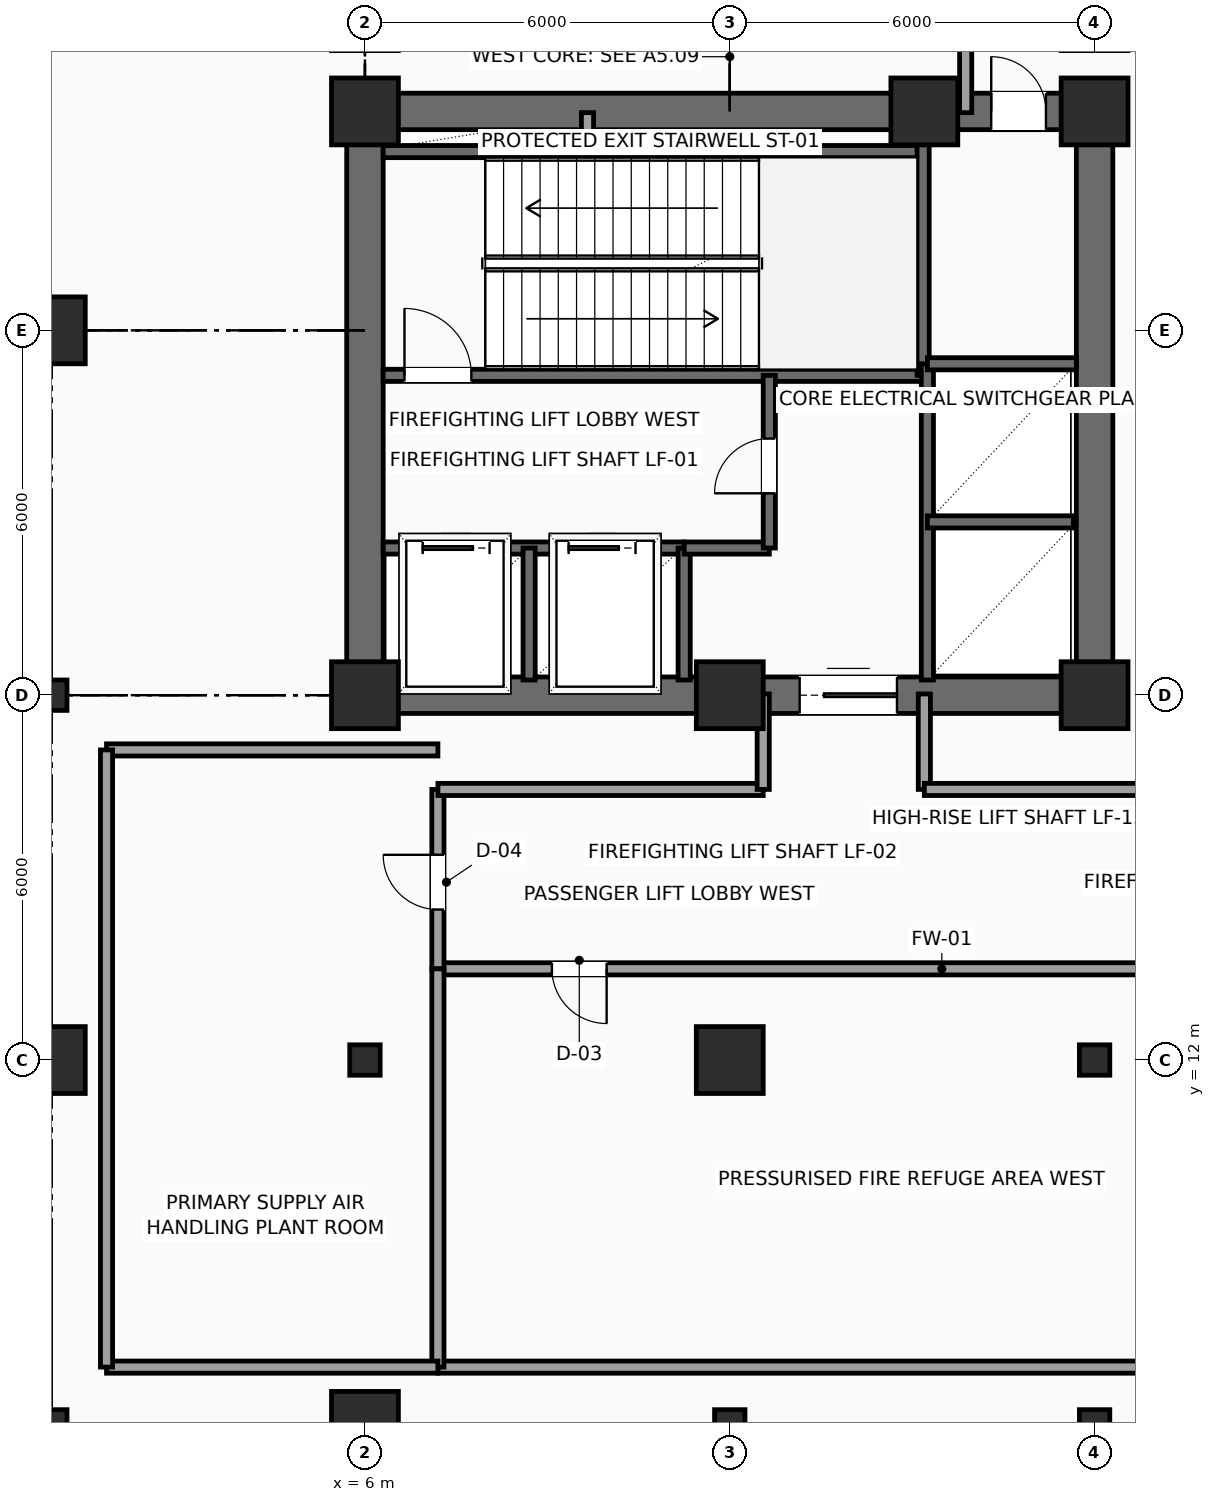
"""IFC4 building model, lengths in metres.
Left out: names, types, materials, properties, quantities, classifications, styles, units other than length and angle.
Written with IfcOpenShell. Run it as: python <this file> out.ifc"""

import sys

from ifc_helpers import new_model, si_unit, direction, frame, frame_2d, origin, origin_2d, place, context, subcontext, project, spatial, rectangle, hollow_rectangle, extrude, element, fill, save


model = new_model("IFC4")
c1 = context("Model", 3, precision=1e-05, world=origin(), true_north=direction((0.0, 1.0)))
c2 = subcontext(c1, "Body", "Model", "MODEL_VIEW")
j1 = project(units=[si_unit("LENGTHUNIT", "METRE"), si_unit("PLANEANGLEUNIT", "RADIAN")], contexts=[c1])
p1 = place(None, origin())
s1 = spatial("IfcSite", under=j1, at=p1, CompositionType="ELEMENT")
p2 = place(p1, origin())
s2 = spatial("IfcBuilding", under=s1, at=p2, CompositionType="ELEMENT")
p3 = place(p2, frame((0.0, 0.0, 164.4)))
s3 = spatial("IfcBuildingStorey", under=s2, at=p3, CompositionType="ELEMENT", Elevation=164.4)
for number, where, z_axis, x_axis in (
    (1, (6.0, 18.0, 0.0), (0.0, 0.0, 1.0), (1.0, 0.0, 0.0)),
    (2, (12.0, 18.0, 0.0), (0.0, 0.0, 1.0), (1.0, 0.0, 0.0)),
    (3, (18.0, 18.0, 0.0), (0.0, 0.0, 1.0), (1.0, 0.0, 0.0)),
    (4, (6.0, 27.6, 0.0), (0.0, 0.0, 1.0), (1.0, 0.0, 0.0)),
    (5, (15.2, 27.6, 0.0), (0.0, 0.0, 1.0), (1.0, 0.0, 0.0)),
    (6, (18.0, 27.6, 0.0), (0.0, 0.0, 1.0), (1.0, 0.0, 0.0)),
):
    element("IfcColumn", number, at=place(p3, frame(where, z_axis=z_axis, x_axis=x_axis)), inside=s3, PredefinedType="COLUMN", context=c2, shape_type="SweptSolid", body=[
        extrude(rectangle(XDim=1.1, YDim=1.1, at=origin_2d()), origin(), (0.0, 0.0, 1.0), 4.8),
    ])
p4 = place(p3, frame((0.85, 6.0, 0.0), z_axis=(0.0, 0.0, 1.0), x_axis=(1.0, 0.0, 0.0)))
e7 = element("IfcColumn", 7, at=p4, inside=s3, PredefinedType="COLUMN", context=c2, shape_type="SweptSolid", body=[
    extrude(hollow_rectangle(XDim=0.5, YDim=0.5, WallThickness=0.025, InnerFilletRadius=0.025, OuterFilletRadius=0.04, at=origin_2d()), origin(), (0.0, 0.0, 1.0), 4.8),
])
p5 = place(p3, frame((0.85, 12.0, 0.0), z_axis=(0.0, 0.0, 1.0), x_axis=(1.0, 0.0, 0.0)))
e8 = element("IfcColumn", 8, at=p5, inside=s3, PredefinedType="COLUMN", context=c2, shape_type="SweptSolid", body=[
    extrude(rectangle(XDim=1.1, YDim=1.1, at=origin_2d()), origin(), (0.0, 0.0, 1.0), 4.8),
])
p6 = place(p3, frame((0.85, 18.0, 0.0), z_axis=(0.0, 0.0, 1.0), x_axis=(1.0, 0.0, 0.0)))
e9 = element("IfcColumn", 9, at=p6, inside=s3, PredefinedType="COLUMN", context=c2, shape_type="SweptSolid", body=[
    extrude(hollow_rectangle(XDim=0.5, YDim=0.5, WallThickness=0.025, InnerFilletRadius=0.025, OuterFilletRadius=0.04, at=origin_2d()), origin(), (0.0, 0.0, 1.0), 4.8),
])
for number, where, z_axis, x_axis in (
    (10, (0.85, 24.0, 0.0), (0.0, 0.0, 1.0), (1.0, 0.0, 0.0)),
    (11, (6.0, 6.0, 0.0), (0.0, 0.0, 1.0), (1.0, 0.0, 0.0)),
):
    element("IfcColumn", number, at=place(p3, frame(where, z_axis=z_axis, x_axis=x_axis)), inside=s3, PredefinedType="COLUMN", context=c2, shape_type="SweptSolid", body=[
        extrude(rectangle(XDim=1.1, YDim=1.1, at=origin_2d()), origin(), (0.0, 0.0, 1.0), 4.8),
    ])
for number, where, z_axis, x_axis in (
    (12, (6.0, 12.0, 0.0), (0.0, 0.0, 1.0), (1.0, 0.0, 0.0)),
    (13, (12.0, 6.0, 0.0), (0.0, 0.0, 1.0), (1.0, 0.0, 0.0)),
):
    element("IfcColumn", number, at=place(p3, frame(where, z_axis=z_axis, x_axis=x_axis)), inside=s3, PredefinedType="COLUMN", context=c2, shape_type="SweptSolid", body=[
        extrude(hollow_rectangle(XDim=0.5, YDim=0.5, WallThickness=0.025, InnerFilletRadius=0.025, OuterFilletRadius=0.04, at=origin_2d()), origin(), (0.0, 0.0, 1.0), 4.8),
    ])
p7 = place(p3, frame((12.0, 12.0, 0.0), z_axis=(0.0, 0.0, 1.0), x_axis=(1.0, 0.0, 0.0)))
e14 = element("IfcColumn", 14, at=p7, inside=s3, PredefinedType="COLUMN", context=c2, shape_type="SweptSolid", body=[
    extrude(rectangle(XDim=1.1, YDim=1.1, at=origin_2d()), origin(), (0.0, 0.0, 1.0), 4.8),
])
for number, where, z_axis, x_axis in (
    (15, (18.0, 6.0, 0.0), (0.0, 0.0, 1.0), (1.0, 0.0, 0.0)),
    (16, (18.0, 12.0, 0.0), (0.0, 0.0, 1.0), (1.0, 0.0, 0.0)),
):
    element("IfcColumn", number, at=place(p3, frame(where, z_axis=z_axis, x_axis=x_axis)), inside=s3, PredefinedType="COLUMN", context=c2, shape_type="SweptSolid", body=[
        extrude(hollow_rectangle(XDim=0.5, YDim=0.5, WallThickness=0.025, InnerFilletRadius=0.025, OuterFilletRadius=0.04, at=origin_2d()), origin(), (0.0, 0.0, 1.0), 4.8),
    ])
p8 = place(p3, frame((6.0, 18.0, 0.0), z_axis=(0.0, 0.0, 1.0), x_axis=(1.0, 0.0, 0.0)))
e17 = element("IfcWall", 17, at=p8, inside=s3, PredefinedType="SHEAR", context=c2, shape_type="SweptSolid", body=[
    extrude(rectangle(XDim=12.0, YDim=0.6, at=frame_2d((6.0, 0.0))), origin(), (0.0, 0.0, 1.0), 4.59),
])
p9 = place(p8, frame((7.15, 0.0, 0.0)))
e18 = element("IfcOpeningElement", 18, at=p9, cuts=e17, PredefinedType="OPENING", context=c2, shape_type="SweptSolid", body=[
    extrude(rectangle(XDim=1.6, YDim=2.3, at=frame_2d((0.8, 1.15))), frame((0.0, 0.31, 0.0), z_axis=(0.0, -1.0, 0.0), x_axis=(1.0, 0.0, 0.0)), (0.0, 0.0, 1.0), 0.62),
])
p10 = place(p3, frame((6.0, 27.6, 0.0), z_axis=(0.0, 0.0, 1.0), x_axis=(1.0, 0.0, 0.0)))
e19 = element("IfcWall", 19, at=p10, inside=s3, PredefinedType="SHEAR", context=c2, shape_type="SweptSolid", body=[
    extrude(rectangle(XDim=12.0, YDim=0.6, at=frame_2d((6.0, 0.0))), origin(), (0.0, 0.0, 1.0), 4.59),
])
p11 = place(p10, frame((10.3, 0.0, 0.0)))
e20 = element("IfcOpeningElement", 20, at=p11, cuts=e19, PredefinedType="OPENING", context=c2, shape_type="SweptSolid", body=[
    extrude(rectangle(XDim=0.9, YDim=2.15, at=frame_2d((0.45, 1.075))), frame((0.0, 0.31, 0.0), z_axis=(0.0, -1.0, 0.0), x_axis=(1.0, 0.0, 0.0)), (0.0, 0.0, 1.0), 0.62),
])
for number, where, z_axis, x_axis in (
    (21, (6.0, 18.0, 0.0), (0.0, 0.0, 1.0), (0.0, 1.0, 0.0)),
    (22, (18.0, 18.0, 0.0), (0.0, 0.0, 1.0), (0.0, 1.0, 0.0)),
):
    element("IfcWall", number, at=place(p3, frame(where, z_axis=z_axis, x_axis=x_axis)), inside=s3, PredefinedType="SHEAR", context=c2, shape_type="SweptSolid", body=[
        extrude(rectangle(XDim=9.6, YDim=0.6, at=frame_2d((4.8, 0.0))), origin(), (0.0, 0.0, 1.0), 4.59),
    ])
p12 = place(p3, frame((6.3, 23.26, 0.0), z_axis=(0.0, 0.0, 1.0), x_axis=(1.0, 0.0, 0.0)))
e23 = element("IfcWall", 23, at=p12, inside=s3, PredefinedType="SHEAR", context=c2, shape_type="SweptSolid", body=[
    extrude(rectangle(XDim=8.88, YDim=0.2, at=frame_2d((4.44, 0.0))), origin(), (0.0, 0.0, 1.0), 4.59),
])
p13 = place(p12, frame((0.35, 0.0, 0.0)))
e24 = element("IfcOpeningElement", 24, at=p13, cuts=e23, PredefinedType="OPENING", context=c2, shape_type="SweptSolid", body=[
    extrude(rectangle(XDim=1.1, YDim=2.2, at=frame_2d((0.55, 1.1))), frame((0.0, 0.11, 0.0), z_axis=(0.0, -1.0, 0.0), x_axis=(1.0, 0.0, 0.0)), (0.0, 0.0, 1.0), 0.22),
])
p14 = place(p3, frame((6.3, 26.94, 0.0), z_axis=(0.0, 0.0, 1.0), x_axis=(1.0, 0.0, 0.0)))
e25 = element("IfcWall", 25, at=p14, inside=s3, PredefinedType="SHEAR", context=c2, shape_type="SweptSolid", body=[
    extrude(rectangle(XDim=8.88, YDim=0.2, at=frame_2d((4.44, 0.0))), origin(), (0.0, 0.0, 1.0), 4.59),
])
p15 = place(p3, frame((15.18, 23.26, 0.0), z_axis=(0.0, 0.0, 1.0), x_axis=(0.0, 1.0, 0.0)))
e26 = element("IfcWall", 26, at=p15, inside=s3, PredefinedType="SHEAR", context=c2, shape_type="SweptSolid", body=[
    extrude(rectangle(XDim=4.04, YDim=0.2, at=frame_2d((2.02, 0.0))), origin(), (0.0, 0.0, 1.0), 4.59),
])
p16 = place(p3, frame((6.3, 20.42, 0.0), z_axis=(0.0, 0.0, 1.0), x_axis=(1.0, 0.0, 0.0)))
e27 = element("IfcWall", 27, at=p16, inside=s3, PredefinedType="SHEAR", context=c2, shape_type="SweptSolid", body=[
    extrude(rectangle(XDim=4.95, YDim=0.2, at=frame_2d((2.475, 0.0))), origin(), (0.0, 0.0, 1.0), 4.59),
])
p17 = place(p16, frame((0.65, 0.0, 0.0)))
e28 = element("IfcOpeningElement", 28, at=p17, cuts=e27, PredefinedType="OPENING", context=c2, shape_type="SweptSolid", body=[
    extrude(rectangle(XDim=1.1, YDim=2.2, at=frame_2d((0.55, 1.1))), frame((0.0, 0.11, 0.0), z_axis=(0.0, -1.0, 0.0), x_axis=(1.0, 0.0, 0.0)), (0.0, 0.0, 1.0), 0.22),
])
p18 = place(p16, frame((3.05, 0.0, 0.0)))
e29 = element("IfcOpeningElement", 29, at=p18, cuts=e27, PredefinedType="OPENING", context=c2, shape_type="SweptSolid", body=[
    extrude(rectangle(XDim=1.1, YDim=2.2, at=frame_2d((0.55, 1.1))), frame((0.0, 0.11, 0.0), z_axis=(0.0, -1.0, 0.0), x_axis=(1.0, 0.0, 0.0)), (0.0, 0.0, 1.0), 0.22),
])
for number, where, z_axis, x_axis in (
    (30, (8.7, 18.25, 0.0), (0.0, 0.0, 1.0), (0.0, 1.0, 0.0)),
    (31, (11.25, 18.25, 0.0), (0.0, 0.0, 1.0), (0.0, 1.0, 0.0)),
):
    element("IfcWall", number, at=place(p3, frame(where, z_axis=z_axis, x_axis=x_axis)), inside=s3, PredefinedType="SHEAR", context=c2, shape_type="SweptSolid", body=[
        extrude(rectangle(XDim=2.17, YDim=0.2, at=frame_2d((1.085, 0.0))), origin(), (0.0, 0.0, 1.0), 4.59),
    ])
p19 = place(p3, frame((11.25, 20.42, 0.0), z_axis=(0.0, 0.0, 1.0), x_axis=(1.0, 0.0, 0.0)))
e32 = element("IfcWall", 32, at=p19, inside=s3, PredefinedType="SHEAR", context=c2, shape_type="SweptSolid", body=[
    extrude(rectangle(XDim=1.4, YDim=0.2, at=frame_2d((0.7, 0.0))), origin(), (0.0, 0.0, 1.0), 4.59),
])
p20 = place(p3, frame((12.65, 20.42, 0.0), z_axis=(0.0, 0.0, 1.0), x_axis=(0.0, 1.0, 0.0)))
e33 = element("IfcWall", 33, at=p20, inside=s3, PredefinedType="SHEAR", context=c2, shape_type="SweptSolid", body=[
    extrude(rectangle(XDim=2.84, YDim=0.2, at=frame_2d((1.42, 0.0))), origin(), (0.0, 0.0, 1.0), 4.59),
])
p21 = place(p20, frame((0.9, 0.0, 0.0)))
e34 = element("IfcOpeningElement", 34, at=p21, cuts=e33, PredefinedType="OPENING", context=c2, shape_type="SweptSolid", body=[
    extrude(rectangle(XDim=0.9, YDim=2.15, at=frame_2d((0.45, 1.075))), frame((0.0, 0.11, 0.0), z_axis=(0.0, -1.0, 0.0), x_axis=(1.0, 0.0, 0.0)), (0.0, 0.0, 1.0), 0.22),
])
p22 = place(p3, frame((9.66, 26.94, 0.0), z_axis=(0.0, 0.0, 1.0), x_axis=(0.0, 1.0, 0.0)))
e35 = element("IfcWall", 35, at=p22, inside=s3, PredefinedType="SOLIDWALL", context=c2, shape_type="SweptSolid", body=[
    extrude(rectangle(XDim=0.64, YDim=0.2, at=frame_2d((0.32, 0.0))), origin(), (0.0, 0.0, 1.0), 4.59),
])
p23 = place(p3, frame((15.25, 18.25, 0.0), z_axis=(0.0, 0.0, 1.0), x_axis=(0.0, 1.0, 0.0)))
e36 = element("IfcWall", 36, at=p23, inside=s3, PredefinedType="SHEAR", context=c2, shape_type="SweptSolid", body=[
    extrude(rectangle(XDim=5.2, YDim=0.2, at=frame_2d((2.6, 0.0))), origin(), (0.0, 0.0, 1.0), 4.59),
])
p24 = place(p3, frame((15.25, 20.85, 0.0), z_axis=(0.0, 0.0, 1.0), x_axis=(1.0, 0.0, 0.0)))
e37 = element("IfcWall", 37, at=p24, inside=s3, PredefinedType="SHEAR", context=c2, shape_type="SweptSolid", body=[
    extrude(rectangle(XDim=2.4, YDim=0.2, at=frame_2d((1.2, 0.0))), origin(), (0.0, 0.0, 1.0), 4.59),
])
p25 = place(p3, frame((15.25, 23.45, 0.0), z_axis=(0.0, 0.0, 1.0), x_axis=(1.0, 0.0, 0.0)))
e38 = element("IfcWall", 38, at=p25, inside=s3, PredefinedType="SHEAR", context=c2, shape_type="SweptSolid", body=[
    extrude(rectangle(XDim=2.45, YDim=0.2, at=frame_2d((1.225, 0.0))), origin(), (0.0, 0.0, 1.0), 4.59),
])
p26 = place(p3, frame((20.75, 13.5, 0.0), z_axis=(0.0, 0.0, 1.0), x_axis=(-1.0, 0.0, 0.0)))
e39 = element("IfcWall", 39, at=p26, inside=s3, PredefinedType="SOLIDWALL", context=c2, shape_type="SweptSolid", body=[
    extrude(rectangle(XDim=13.55, YDim=0.2, at=frame_2d((6.775, 0.0))), origin(), (0.0, 0.0, 1.0), 4.59),
])
p27 = place(p26, frame((10.775, 0.0, 0.0)))
e40 = element("IfcOpeningElement", 40, at=p27, cuts=e39, PredefinedType="OPENING", context=c2, shape_type="SweptSolid", body=[
    extrude(rectangle(XDim=0.9, YDim=2.15, at=frame_2d((0.45, 1.075))), frame((0.0, 0.11, 0.0), z_axis=(0.0, -1.0, 0.0), x_axis=(1.0, 0.0, 0.0)), (0.0, 0.0, 1.0), 0.22),
])
p28 = place(p3, frame((7.2, 13.5, 0.0), z_axis=(0.0, 0.0, 1.0), x_axis=(0.0, 1.0, 0.0)))
e41 = element("IfcWall", 41, at=p28, inside=s3, PredefinedType="SOLIDWALL", context=c2, shape_type="SweptSolid", body=[
    extrude(rectangle(XDim=2.95, YDim=0.2, at=frame_2d((1.475, 0.0))), origin(), (0.0, 0.0, 1.0), 4.59),
])
p29 = place(p28, frame((0.975, 0.0, 0.0)))
e42 = element("IfcOpeningElement", 42, at=p29, cuts=e41, PredefinedType="OPENING", context=c2, shape_type="SweptSolid", body=[
    extrude(rectangle(XDim=0.9, YDim=2.15, at=frame_2d((0.45, 1.075))), frame((0.0, 0.11, 0.0), z_axis=(0.0, -1.0, 0.0), x_axis=(1.0, 0.0, 0.0)), (0.0, 0.0, 1.0), 0.22),
])
p30 = place(p3, frame((7.2, 16.45, 0.0), z_axis=(0.0, 0.0, 1.0), x_axis=(1.0, 0.0, 0.0)))
e43 = element("IfcWall", 43, at=p30, inside=s3, PredefinedType="SOLIDWALL", context=c2, shape_type="SweptSolid", body=[
    extrude(rectangle(XDim=5.35, YDim=0.2, at=frame_2d((2.675, 0.0))), origin(), (0.0, 0.0, 1.0), 4.59),
])
for number, where, z_axis, x_axis in (
    (44, (12.55, 16.45, 0.0), (0.0, 0.0, 1.0), (0.0, 1.0, 0.0)),
    (45, (15.2, 18.02, 0.0), (0.0, 0.0, 1.0), (0.0, -1.0, 0.0)),
):
    element("IfcWall", number, at=place(p3, frame(where, z_axis=z_axis, x_axis=x_axis)), inside=s3, PredefinedType="SOLIDWALL", context=c2, shape_type="SweptSolid", body=[
        extrude(rectangle(XDim=1.57, YDim=0.2, at=frame_2d((0.785, 0.0))), origin(), (0.0, 0.0, 1.0), 4.59),
    ])
p31 = place(p3, frame((15.2, 16.45, 0.0), z_axis=(0.0, 0.0, 1.0), x_axis=(1.0, 0.0, 0.0)))
e46 = element("IfcWall", 46, at=p31, inside=s3, PredefinedType="SOLIDWALL", context=c2, shape_type="SweptSolid", body=[
    extrude(rectangle(XDim=3.7, YDim=0.2, at=frame_2d((1.85, 0.0))), origin(), (0.0, 0.0, 1.0), 4.59),
])
p32 = place(p3, frame((15.88, 27.58, 0.0), z_axis=(0.0, 0.0, 1.0), x_axis=(0.0, 1.0, 0.0)))
e47 = element("IfcWall", 47, at=p32, inside=s3, PredefinedType="SOLIDWALL", context=c2, shape_type="SweptSolid", body=[
    extrude(rectangle(XDim=2.52, YDim=0.2, at=frame_2d((1.26, 0.0))), origin(), (0.0, 0.0, 1.0), 4.59),
])
p33 = place(p3, frame((7.2, 6.95, 0.0), z_axis=(0.0, 0.0, 1.0), x_axis=(1.0, 0.0, 0.0)))
e48 = element("IfcWall", 48, at=p33, inside=s3, PredefinedType="SOLIDWALL", context=c2, shape_type="SweptSolid", body=[
    extrude(rectangle(XDim=13.55, YDim=0.2, at=frame_2d((6.775, 0.0))), origin(), (0.0, 0.0, 1.0), 4.59),
])
p34 = place(p3, frame((7.2, 6.95, 0.0), z_axis=(0.0, 0.0, 1.0), x_axis=(0.0, 1.0, 0.0)))
e49 = element("IfcWall", 49, at=p34, inside=s3, PredefinedType="SOLIDWALL", context=c2, shape_type="SweptSolid", body=[
    extrude(rectangle(XDim=6.55, YDim=0.2, at=frame_2d((3.275, 0.0))), origin(), (0.0, 0.0, 1.0), 4.59),
])
for number, where, z_axis, x_axis in (
    (50, (1.75, 6.95, 0.0), (0.0, 0.0, 1.0), (1.0, 0.0, 0.0)),
    (51, (1.75, 17.1, 0.0), (0.0, 0.0, 1.0), (1.0, 0.0, 0.0)),
):
    element("IfcWall", number, at=place(p3, frame(where, z_axis=z_axis, x_axis=x_axis)), inside=s3, PredefinedType="SOLIDWALL", context=c2, shape_type="SweptSolid", body=[
        extrude(rectangle(XDim=5.45, YDim=0.2, at=frame_2d((2.725, 0.0))), origin(), (0.0, 0.0, 1.0), 4.59),
    ])
p35 = place(p3, frame((1.75, 6.95, 0.0), z_axis=(0.0, 0.0, 1.0), x_axis=(0.0, 1.0, 0.0)))
e52 = element("IfcWall", 52, at=p35, inside=s3, PredefinedType="SOLIDWALL", context=c2, shape_type="SweptSolid", body=[
    extrude(rectangle(XDim=10.15, YDim=0.2, at=frame_2d((5.075, 0.0))), origin(), (0.0, 0.0, 1.0), 4.59),
])
p36 = place(p9, origin())
e53 = element("IfcDoor", 53, at=p36, inside=s3, OperationType="DOUBLE_DOOR_SLIDING", PredefinedType="DOOR", context=c2, shape_type="SweptSolid", body=[
    extrude(rectangle(XDim=1.6, YDim=2.3, at=frame_2d((0.8, 1.15))), frame((0.0, 0.025, 0.0), z_axis=(0.0, -1.0, 0.0), x_axis=(1.0, 0.0, 0.0)), (0.0, 0.0, 1.0), 0.05),
])
fill(e18, e53)
p37 = place(p11, origin())
e54 = element("IfcDoor", 54, at=p37, inside=s3, OperationType="SINGLE_SWING_LEFT", PredefinedType="DOOR", context=c2, shape_type="SweptSolid", body=[
    extrude(rectangle(XDim=0.9, YDim=2.15, at=frame_2d((0.45, 1.075))), frame((0.0, 0.025, 0.0), z_axis=(0.0, -1.0, 0.0), x_axis=(1.0, 0.0, 0.0)), (0.0, 0.0, 1.0), 0.05),
])
fill(e20, e54)
p38 = place(p13, origin())
e55 = element("IfcDoor", 55, at=p38, inside=s3, OperationType="SINGLE_SWING_LEFT", PredefinedType="DOOR", context=c2, shape_type="SweptSolid", body=[
    extrude(rectangle(XDim=1.1, YDim=2.2, at=frame_2d((0.55, 1.1))), frame((0.0, 0.025, 0.0), z_axis=(0.0, -1.0, 0.0), x_axis=(1.0, 0.0, 0.0)), (0.0, 0.0, 1.0), 0.05),
])
fill(e24, e55)
p39 = place(p17, origin())
e56 = element("IfcDoor", 56, at=p39, inside=s3, OperationType="SLIDING_TO_LEFT", PredefinedType="DOOR", context=c2, shape_type="SweptSolid", body=[
    extrude(rectangle(XDim=1.1, YDim=2.2, at=frame_2d((0.55, 1.1))), frame((0.0, 0.025, 0.0), z_axis=(0.0, -1.0, 0.0), x_axis=(1.0, 0.0, 0.0)), (0.0, 0.0, 1.0), 0.05),
])
fill(e28, e56)
p40 = place(p18, origin())
e57 = element("IfcDoor", 57, at=p40, inside=s3, OperationType="SLIDING_TO_LEFT", PredefinedType="DOOR", context=c2, shape_type="SweptSolid", body=[
    extrude(rectangle(XDim=1.1, YDim=2.2, at=frame_2d((0.55, 1.1))), frame((0.0, 0.025, 0.0), z_axis=(0.0, -1.0, 0.0), x_axis=(1.0, 0.0, 0.0)), (0.0, 0.0, 1.0), 0.05),
])
fill(e29, e57)
p41 = place(p21, origin())
e58 = element("IfcDoor", 58, at=p41, inside=s3, OperationType="SINGLE_SWING_LEFT", PredefinedType="DOOR", context=c2, shape_type="SweptSolid", body=[
    extrude(rectangle(XDim=0.9, YDim=2.15, at=frame_2d((0.45, 1.075))), frame((0.0, 0.025, 0.0), z_axis=(0.0, -1.0, 0.0), x_axis=(1.0, 0.0, 0.0)), (0.0, 0.0, 1.0), 0.05),
])
fill(e34, e58)
p42 = place(p27, origin())
e59 = element("IfcDoor", 59, at=p42, inside=s3, OperationType="SINGLE_SWING_LEFT", PredefinedType="DOOR", context=c2, shape_type="SweptSolid", body=[
    extrude(rectangle(XDim=0.9, YDim=2.15, at=frame_2d((0.45, 1.075))), frame((0.0, 0.025, 0.0), z_axis=(0.0, -1.0, 0.0), x_axis=(1.0, 0.0, 0.0)), (0.0, 0.0, 1.0), 0.05),
])
fill(e40, e59)
p43 = place(p29, origin())
e60 = element("IfcDoor", 60, at=p43, inside=s3, OperationType="SINGLE_SWING_RIGHT", PredefinedType="DOOR", context=c2, shape_type="SweptSolid", body=[
    extrude(rectangle(XDim=0.9, YDim=2.15, at=frame_2d((0.45, 1.075))), frame((0.0, 0.025, 0.0), z_axis=(0.0, -1.0, 0.0), x_axis=(1.0, 0.0, 0.0)), (0.0, 0.0, 1.0), 0.05),
])
fill(e42, e60)
save(model, sys.argv[1])
